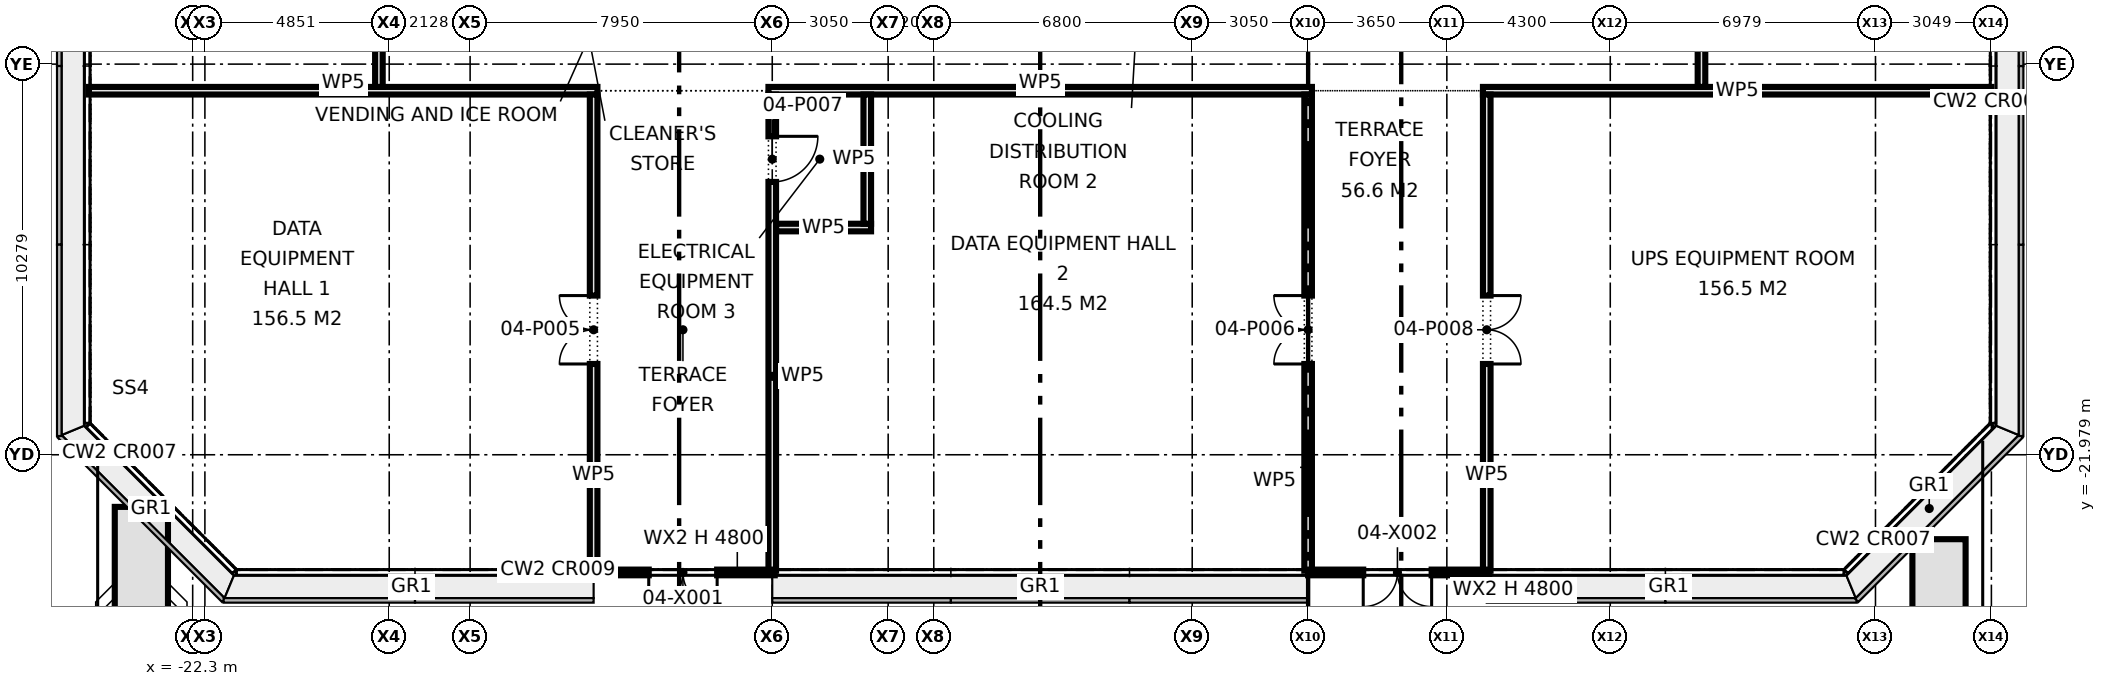
"""IFC4 building model, lengths in metres.
Left out: names, types, materials, properties, quantities, classifications, styles, units other than length and angle.
Written with IfcOpenShell. Run it as: python <this file> out.ifc"""

import sys

from ifc_helpers import new_model, si_unit, direction, frame, frame_2d, origin, origin_2d, place, context, subcontext, project, spatial, rectangle, extrude, element, fill, save


model = new_model("IFC4")
c1 = context("Model", 3, precision=1e-05, world=origin(), true_north=direction((0.0, 1.0)))
c2 = subcontext(c1, "Body", "Model", "MODEL_VIEW")
j1 = project(units=[si_unit("LENGTHUNIT", "METRE"), si_unit("PLANEANGLEUNIT", "RADIAN")], contexts=[c1])
p1 = place(None, origin())
s1 = spatial("IfcSite", under=j1, at=p1, CompositionType="ELEMENT")
p2 = place(p1, origin())
s2 = spatial("IfcBuilding", under=s1, at=p2, CompositionType="ELEMENT")
p3 = place(p2, frame((0.0, 0.0, 16.1)))
s3 = spatial("IfcBuildingStorey", under=s2, at=p3, CompositionType="ELEMENT", Elevation=16.1)
p4 = place(p3, frame((-11.75, -25.075, 0.0), z_axis=(0.0, 0.0, 1.0), x_axis=(1.0, 0.0, 0.0)))
e1 = element("IfcWall", 1, at=p4, inside=s3, PredefinedType="STANDARD", context=c2, shape_type="SweptSolid", body=[
    extrude(rectangle(XDim=4.765, YDim=0.15, at=frame_2d((2.382, 0.0))), origin(), (0.0, 0.0, 1.0), 4.8),
])
p5 = place(p4, frame((1.45, 0.0, 0.0)))
e2 = element("IfcOpeningElement", 2, at=p5, cuts=e1, PredefinedType="OPENING", context=c2, shape_type="SweptSolid", body=[
    extrude(rectangle(XDim=1.8, YDim=2.1, at=frame_2d((0.9, 1.05))), frame((0.0, 0.085, 0.0), z_axis=(0.0, -1.0, 0.0), x_axis=(1.0, 0.0, 0.0)), (0.0, 0.0, 1.0), 0.17),
])
p6 = place(p3, frame((7.05, -25.075, 0.0), z_axis=(0.0, 0.0, 1.0), x_axis=(1.0, 0.0, 0.0)))
e3 = element("IfcWall", 3, at=p6, inside=s3, PredefinedType="STANDARD", context=c2, shape_type="SweptSolid", body=[
    extrude(rectangle(XDim=4.765, YDim=0.15, at=frame_2d((2.382, 0.0))), origin(), (0.0, 0.0, 1.0), 4.8),
])
p7 = place(p6, frame((1.45, 0.0, 0.0)))
e4 = element("IfcOpeningElement", 4, at=p7, cuts=e3, PredefinedType="OPENING", context=c2, shape_type="SweptSolid", body=[
    extrude(rectangle(XDim=1.8, YDim=2.1, at=frame_2d((0.9, 1.05))), frame((0.0, 0.085, 0.0), z_axis=(0.0, -1.0, 0.0), x_axis=(1.0, 0.0, 0.0)), (0.0, 0.0, 1.0), 0.17),
])
for number, where, z_axis, x_axis in (
    (5, (-23.65, -23.35, 0.0), (0.0, 0.0, 1.0), (0.0, -1.0, 0.0)),
    (6, (23.65, -30.2, 0.0), (0.0, 0.0, 1.0), (0.0, 1.0, 0.0)),
):
    element("IfcWall", number, at=place(p3, frame(where, z_axis=z_axis, x_axis=x_axis)), inside=s3, PredefinedType="STANDARD", context=c2, shape_type="SweptSolid", body=[
        extrude(rectangle(XDim=6.0, YDim=1.4, at=frame_2d((3.0, 0.0))), origin(), (0.0, 0.0, 1.0), 0.6),
    ])
p8 = place(p3, frame((-6.95, -16.0, 0.0), z_axis=(0.0, 0.0, 1.0), x_axis=(1.0, 0.0, 0.0)))
e7 = element("IfcWall", 7, at=p8, inside=s3, PredefinedType="PARTITIONING", context=c2, shape_type="SweptSolid", body=[
    extrude(rectangle(XDim=2.5, YDim=0.2, at=frame_2d((1.25, 0.0))), origin(), (0.0, 0.0, 1.0), 4.575),
])
p9 = place(p3, frame((-25.03, -12.4, 0.0), z_axis=(0.0, 0.0, 1.0), x_axis=(1.0, 0.0, 0.0)))
e8 = element("IfcWall", 8, at=p9, inside=s3, PredefinedType="PARTITIONING", context=c2, shape_type="SweptSolid", body=[
    extrude(rectangle(XDim=13.38, YDim=0.2, at=frame_2d((6.69, 0.0))), origin(), (0.0, 0.0, 1.0), 4.575),
])
p10 = place(p3, frame((-7.15, -12.4, 0.0), z_axis=(0.0, 0.0, 1.0), x_axis=(1.0, 0.0, 0.0)))
e9 = element("IfcWall", 9, at=p10, inside=s3, PredefinedType="PARTITIONING", context=c2, shape_type="SweptSolid", body=[
    extrude(rectangle(XDim=14.3, YDim=0.2, at=frame_2d((7.15, 0.0))), origin(), (0.0, 0.0, 1.0), 4.575),
])
p11 = place(p3, frame((11.65, -12.4, 0.0), z_axis=(0.0, 0.0, 1.0), x_axis=(1.0, 0.0, 0.0)))
e10 = element("IfcWall", 10, at=p11, inside=s3, PredefinedType="PARTITIONING", context=c2, shape_type="SweptSolid", body=[
    extrude(rectangle(XDim=13.38, YDim=0.2, at=frame_2d((6.69, 0.0))), origin(), (0.0, 0.0, 1.0), 4.575),
])
p12 = place(p3, frame((17.4, -12.3, 0.0), z_axis=(0.0, 0.0, 1.0), x_axis=(0.0, 1.0, 0.0)))
e11 = element("IfcWall", 11, at=p12, inside=s3, PredefinedType="PARTITIONING", context=c2, shape_type="SweptSolid", body=[
    extrude(rectangle(XDim=24.6, YDim=0.2, at=frame_2d((12.3, 0.0))), origin(), (0.0, 0.0, 1.0), 4.575),
])
p13 = place(p12, frame((6.375, 0.0, 0.0)))
e12 = element("IfcOpeningElement", 12, at=p13, cuts=e11, PredefinedType="OPENING", context=c2, shape_type="SweptSolid", body=[
    extrude(rectangle(XDim=1.8, YDim=2.1, at=frame_2d((0.9, 1.05))), frame((0.0, 0.11, 0.0), z_axis=(0.0, -1.0, 0.0), x_axis=(1.0, 0.0, 0.0)), (0.0, 0.0, 1.0), 0.22),
])
p14 = place(p12, frame((19.075, 0.0, 0.0)))
e13 = element("IfcOpeningElement", 13, at=p14, cuts=e11, PredefinedType="OPENING", context=c2, shape_type="SweptSolid", body=[
    extrude(rectangle(XDim=1.2, YDim=2.1, at=frame_2d((0.6, 1.05))), frame((0.0, 0.11, 0.0), z_axis=(0.0, -1.0, 0.0), x_axis=(1.0, 0.0, 0.0)), (0.0, 0.0, 1.0), 0.22),
])
p15 = place(p3, frame((11.75, -25.03, 0.0), z_axis=(0.0, 0.0, 1.0), x_axis=(0.0, 1.0, 0.0)))
e14 = element("IfcWall", 14, at=p15, inside=s3, PredefinedType="PARTITIONING", context=c2, shape_type="SweptSolid", body=[
    extrude(rectangle(XDim=12.53, YDim=0.2, at=frame_2d((6.265, 0.0))), origin(), (0.0, 0.0, 1.0), 4.575),
])
p16 = place(p15, frame((5.44, 0.0, 0.0)))
e15 = element("IfcOpeningElement", 15, at=p16, cuts=e14, PredefinedType="OPENING", context=c2, shape_type="SweptSolid", body=[
    extrude(rectangle(XDim=1.8, YDim=2.1, at=frame_2d((0.9, 1.05))), frame((0.0, 0.11, 0.0), z_axis=(0.0, -1.0, 0.0), x_axis=(1.0, 0.0, 0.0)), (0.0, 0.0, 1.0), 0.22),
])
p17 = place(p3, frame((7.05, -25.03, 0.0), z_axis=(0.0, 0.0, 1.0), x_axis=(0.0, 1.0, 0.0)))
e16 = element("IfcWall", 16, at=p17, inside=s3, PredefinedType="PARTITIONING", context=c2, shape_type="SweptSolid", body=[
    extrude(rectangle(XDim=12.53, YDim=0.2, at=frame_2d((6.265, 0.0))), origin(), (0.0, 0.0, 1.0), 4.575),
])
p18 = place(p17, frame((5.44, 0.0, 0.0)))
e17 = element("IfcOpeningElement", 17, at=p18, cuts=e16, PredefinedType="OPENING", context=c2, shape_type="SweptSolid", body=[
    extrude(rectangle(XDim=1.8, YDim=2.1, at=frame_2d((0.9, 1.05))), frame((0.0, 0.11, 0.0), z_axis=(0.0, -1.0, 0.0), x_axis=(1.0, 0.0, 0.0)), (0.0, 0.0, 1.0), 0.22),
])
p19 = place(p3, frame((-4.55, -15.9, 0.0), z_axis=(0.0, 0.0, 1.0), x_axis=(0.0, 1.0, 0.0)))
e18 = element("IfcWall", 18, at=p19, inside=s3, PredefinedType="PARTITIONING", context=c2, shape_type="SweptSolid", body=[
    extrude(rectangle(XDim=3.4, YDim=0.2, at=frame_2d((1.7, 0.0))), origin(), (0.0, 0.0, 1.0), 4.575),
])
p20 = place(p3, frame((-7.05, -25.03, 0.0), z_axis=(0.0, 0.0, 1.0), x_axis=(0.0, 1.0, 0.0)))
e19 = element("IfcWall", 19, at=p20, inside=s3, PredefinedType="PARTITIONING", context=c2, shape_type="SweptSolid", body=[
    extrude(rectangle(XDim=12.53, YDim=0.2, at=frame_2d((6.265, 0.0))), origin(), (0.0, 0.0, 1.0), 4.575),
])
p21 = place(p20, frame((10.23, 0.0, 0.0)))
e20 = element("IfcOpeningElement", 20, at=p21, cuts=e19, PredefinedType="OPENING", context=c2, shape_type="SweptSolid", body=[
    extrude(rectangle(XDim=1.2, YDim=2.1, at=frame_2d((0.6, 1.05))), frame((0.0, 0.11, 0.0), z_axis=(0.0, -1.0, 0.0), x_axis=(1.0, 0.0, 0.0)), (0.0, 0.0, 1.0), 0.22),
])
p22 = place(p3, frame((-11.75, -25.03, 0.0), z_axis=(0.0, 0.0, 1.0), x_axis=(0.0, 1.0, 0.0)))
e21 = element("IfcWall", 21, at=p22, inside=s3, PredefinedType="PARTITIONING", context=c2, shape_type="SweptSolid", body=[
    extrude(rectangle(XDim=12.53, YDim=0.2, at=frame_2d((6.265, 0.0))), origin(), (0.0, 0.0, 1.0), 4.575),
])
p23 = place(p22, frame((5.44, 0.0, 0.0)))
e22 = element("IfcOpeningElement", 22, at=p23, cuts=e21, PredefinedType="OPENING", context=c2, shape_type="SweptSolid", body=[
    extrude(rectangle(XDim=1.8, YDim=2.1, at=frame_2d((0.9, 1.05))), frame((0.0, 0.11, 0.0), z_axis=(0.0, -1.0, 0.0), x_axis=(1.0, 0.0, 0.0)), (0.0, 0.0, 1.0), 0.22),
])
p24 = place(p3, frame((-17.4, -12.3, 0.0), z_axis=(0.0, 0.0, 1.0), x_axis=(0.0, 1.0, 0.0)))
e23 = element("IfcWall", 23, at=p24, inside=s3, PredefinedType="PARTITIONING", context=c2, shape_type="SweptSolid", body=[
    extrude(rectangle(XDim=24.6, YDim=0.2, at=frame_2d((12.3, 0.0))), origin(), (0.0, 0.0, 1.0), 4.575),
])
p25 = place(p24, frame((6.675, 0.0, 0.0)))
e24 = element("IfcOpeningElement", 24, at=p25, cuts=e23, PredefinedType="OPENING", context=c2, shape_type="SweptSolid", body=[
    extrude(rectangle(XDim=1.2, YDim=2.1, at=frame_2d((0.6, 1.05))), frame((0.0, 0.11, 0.0), z_axis=(0.0, -1.0, 0.0), x_axis=(1.0, 0.0, 0.0)), (0.0, 0.0, 1.0), 0.22),
])
p26 = place(p24, frame((18.775, 0.0, 0.0)))
e25 = element("IfcOpeningElement", 25, at=p26, cuts=e23, PredefinedType="OPENING", context=c2, shape_type="SweptSolid", body=[
    extrude(rectangle(XDim=1.8, YDim=2.1, at=frame_2d((0.9, 1.05))), frame((0.0, 0.11, 0.0), z_axis=(0.0, -1.0, 0.0), x_axis=(1.0, 0.0, 0.0)), (0.0, 0.0, 1.0), 0.22),
])
p27 = place(p5, frame((1.8, 0.0, 0.0), z_axis=(0.0, 0.0, 1.0), x_axis=(-1.0, 0.0, 0.0)))
e26 = element("IfcDoor", 26, at=p27, inside=s3, OperationType="DOUBLE_DOOR_DOUBLE_SWING", PredefinedType="DOOR", context=c2, shape_type="SweptSolid", body=[
    extrude(rectangle(XDim=1.8, YDim=2.1, at=frame_2d((0.9, 1.05))), frame((0.0, 0.025, 0.0), z_axis=(0.0, -1.0, 0.0), x_axis=(1.0, 0.0, 0.0)), (0.0, 0.0, 1.0), 0.05),
])
fill(e2, e26)
p28 = place(p7, frame((1.8, 0.0, 0.0), z_axis=(0.0, 0.0, 1.0), x_axis=(-1.0, 0.0, 0.0)))
e27 = element("IfcDoor", 27, at=p28, inside=s3, OperationType="DOUBLE_DOOR_DOUBLE_SWING", PredefinedType="DOOR", context=c2, shape_type="SweptSolid", body=[
    extrude(rectangle(XDim=1.8, YDim=2.1, at=frame_2d((0.9, 1.05))), frame((0.0, 0.025, 0.0), z_axis=(0.0, -1.0, 0.0), x_axis=(1.0, 0.0, 0.0)), (0.0, 0.0, 1.0), 0.05),
])
fill(e4, e27)
p29 = place(p3, frame((0.0, 0.0, -0.29)))
p30 = place(p29, frame((-17.167, -27.275, 0.0)))
p31 = place(p30, frame((0.0, 0.0, 0.2)))
e28 = element("IfcWindow", 28, at=p31, inside=s3, PartitioningType="SINGLE_PANEL", PredefinedType="SKYLIGHT", context=c2, shape_type="SweptSolid", body=[
    extrude(rectangle(XDim=1.2, YDim=3.0, at=origin_2d()), origin(), (0.0, 0.0, 1.0), 0.05),
])
p32 = place(p29, frame((-2.25, -27.275, 0.0)))
p33 = place(p32, frame((0.0, 0.0, 0.2)))
e29 = element("IfcWindow", 29, at=p33, inside=s3, PartitioningType="SINGLE_PANEL", PredefinedType="SKYLIGHT", context=c2, shape_type="SweptSolid", body=[
    extrude(rectangle(XDim=1.2, YDim=3.0, at=origin_2d()), origin(), (0.0, 0.0, 1.0), 0.05),
])
p34 = place(p29, frame((16.667, -27.275, 0.0)))
p35 = place(p34, frame((0.0, 0.0, 0.2)))
e30 = element("IfcWindow", 30, at=p35, inside=s3, PartitioningType="SINGLE_PANEL", PredefinedType="SKYLIGHT", context=c2, shape_type="SweptSolid", body=[
    extrude(rectangle(XDim=1.2, YDim=3.0, at=origin_2d()), origin(), (0.0, 0.0, 1.0), 0.05),
])
p36 = place(p23, origin())
e31 = element("IfcDoor", 31, at=p36, inside=s3, OperationType="DOUBLE_DOOR_SINGLE_SWING", PredefinedType="DOOR", context=c2, shape_type="SweptSolid", body=[
    extrude(rectangle(XDim=1.8, YDim=2.1, at=frame_2d((0.9, 1.05))), frame((0.0, 0.025, 0.0), z_axis=(0.0, -1.0, 0.0), x_axis=(1.0, 0.0, 0.0)), (0.0, 0.0, 1.0), 0.05),
])
fill(e22, e31)
p37 = place(p18, origin())
e32 = element("IfcDoor", 32, at=p37, inside=s3, OperationType="DOUBLE_DOOR_SINGLE_SWING", PredefinedType="DOOR", context=c2, shape_type="SweptSolid", body=[
    extrude(rectangle(XDim=1.8, YDim=2.1, at=frame_2d((0.9, 1.05))), frame((0.0, 0.025, 0.0), z_axis=(0.0, -1.0, 0.0), x_axis=(1.0, 0.0, 0.0)), (0.0, 0.0, 1.0), 0.05),
])
fill(e17, e32)
p38 = place(p21, frame((1.2, 0.0, 0.0), z_axis=(0.0, 0.0, 1.0), x_axis=(-1.0, 0.0, 0.0)))
e33 = element("IfcDoor", 33, at=p38, inside=s3, OperationType="SINGLE_SWING_LEFT", PredefinedType="DOOR", context=c2, shape_type="SweptSolid", body=[
    extrude(rectangle(XDim=1.2, YDim=2.1, at=frame_2d((0.6, 1.05))), frame((0.0, 0.025, 0.0), z_axis=(0.0, -1.0, 0.0), x_axis=(1.0, 0.0, 0.0)), (0.0, 0.0, 1.0), 0.05),
])
fill(e20, e33)
p39 = place(p16, frame((1.8, 0.0, 0.0), z_axis=(0.0, 0.0, 1.0), x_axis=(-1.0, 0.0, 0.0)))
e34 = element("IfcDoor", 34, at=p39, inside=s3, OperationType="DOUBLE_DOOR_SINGLE_SWING", PredefinedType="DOOR", context=c2, shape_type="SweptSolid", body=[
    extrude(rectangle(XDim=1.8, YDim=2.1, at=frame_2d((0.9, 1.05))), frame((0.0, 0.025, 0.0), z_axis=(0.0, -1.0, 0.0), x_axis=(1.0, 0.0, 0.0)), (0.0, 0.0, 1.0), 0.05),
])
fill(e15, e34)
save(model, sys.argv[1])
